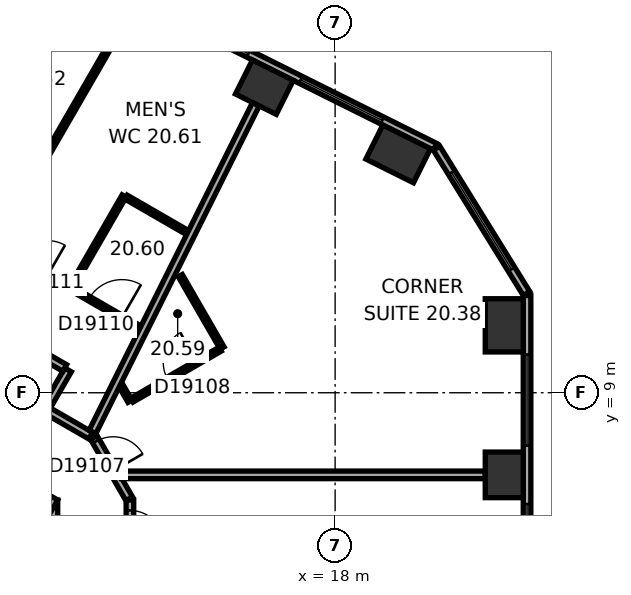
"""IFC4 building model, lengths in metres.
Left out: names, types, materials, properties, quantities, classifications, styles, units other than length and angle.
Written with IfcOpenShell. Run it as: python <this file> out.ifc"""

import sys

from ifc_helpers import new_model, si_unit, direction, frame, frame_2d, origin, origin_2d, place, context, subcontext, project, spatial, rectangle, extrude, element, fill, save


model = new_model("IFC4")
c1 = context("Model", 3, precision=1e-05, world=origin(), true_north=direction((0.0, 1.0)))
c2 = subcontext(c1, "Body", "Model", "MODEL_VIEW")
j1 = project(units=[si_unit("LENGTHUNIT", "METRE"), si_unit("PLANEANGLEUNIT", "RADIAN")], contexts=[c1])
p1 = place(None, origin())
s1 = spatial("IfcSite", under=j1, at=p1, CompositionType="ELEMENT")
p2 = place(p1, origin())
s2 = spatial("IfcBuilding", under=s1, at=p2, CompositionType="ELEMENT")
p3 = place(p2, frame((0.0, 0.0, 90.2)))
s3 = spatial("IfcBuildingStorey", under=s2, at=p3, CompositionType="ELEMENT", Elevation=90.2)
p4 = place(p3, frame((22.45, 6.839, 0.0), z_axis=(0.0, 0.0, 1.0), x_axis=(0.0, 1.0, 0.0)))
e1 = element("IfcColumn", 1, at=p4, inside=s3, PredefinedType="COLUMN", context=c2, shape_type="SweptSolid", body=[
    extrude(rectangle(XDim=1.2, YDim=1.0, at=origin_2d()), origin(), (0.0, 0.0, 1.0), 3.3),
])
for number, where, z_axis, x_axis in (
    (2, (22.45, 10.774, 0.0), (0.0, 0.0, 1.0), (0.0, 1.0, 0.0)),
    (3, (19.659, 15.284, 0.0), (0.0, 0.0, 1.0), (-0.895, 0.446, 0.0)),
):
    element("IfcColumn", number, at=place(p3, frame(where, z_axis=z_axis, x_axis=x_axis)), inside=s3, PredefinedType="COLUMN", context=c2, shape_type="SweptSolid", body=[
        extrude(rectangle(XDim=1.4, YDim=1.0, at=origin_2d()), origin(), (0.0, 0.0, 1.0), 3.3),
    ])
p5 = place(p3, frame((16.138, 17.04, 0.0), z_axis=(0.0, 0.0, 1.0), x_axis=(-0.894934361602, 0.44619781311, 0.0)))
e4 = element("IfcColumn", 4, at=p5, inside=s3, PredefinedType="COLUMN", context=c2, shape_type="SweptSolid", body=[
    extrude(rectangle(XDim=1.2, YDim=1.0, at=origin_2d()), origin(), (0.0, 0.0, 1.0), 3.3),
])
p6 = place(p3, frame((10.1, -6.177, 0.0), z_axis=(0.0, 0.0, 1.0), x_axis=(0.0, 1.0, 0.0)))
e5 = element("IfcWall", 5, at=p6, inside=s3, PredefinedType="SHEAR", context=c2, shape_type="SweptSolid", body=[
    extrude(rectangle(XDim=12.355, YDim=1.2, at=frame_2d((6.177, 0.0))), origin(), (0.0, 0.0, 1.0), 3.3),
])
p7 = place(p6, frame((6.378, 0.0, 0.0)))
e6 = element("IfcOpeningElement", 6, at=p7, cuts=e5, PredefinedType="OPENING", context=c2, shape_type="SweptSolid", body=[
    extrude(rectangle(XDim=1.5, YDim=2.1, at=frame_2d((0.75, 1.05))), frame((0.0, 0.61, 0.0), z_axis=(0.0, -1.0, 0.0), x_axis=(1.0, 0.0, 0.0)), (0.0, 0.0, 1.0), 1.22),
])
p8 = place(p6, frame((1.828, 0.0, 0.0)))
e7 = element("IfcOpeningElement", 7, at=p8, cuts=e5, PredefinedType="OPENING", context=c2, shape_type="SweptSolid", body=[
    extrude(rectangle(XDim=1.1, YDim=2.1, at=frame_2d((0.55, 1.05))), frame((0.0, 0.61, 0.0), z_axis=(0.0, -1.0, 0.0), x_axis=(1.0, 0.0, 0.0)), (0.0, 0.0, 1.0), 1.22),
])
p9 = place(p6, frame((4.427, 0.0, 0.0)))
e8 = element("IfcOpeningElement", 8, at=p9, cuts=e5, PredefinedType="OPENING", context=c2, shape_type="SweptSolid", body=[
    extrude(rectangle(XDim=1.1, YDim=2.1, at=frame_2d((0.55, 1.05))), frame((0.0, 0.61, 0.0), z_axis=(0.0, -1.0, 0.0), x_axis=(1.0, 0.0, 0.0)), (0.0, 0.0, 1.0), 1.22),
])
p10 = place(p3, frame((10.4, 5.658, 0.0), z_axis=(0.0, 0.0, 1.0), x_axis=(-0.866021384402, 0.500006961711, 0.0)))
e9 = element("IfcWall", 9, at=p10, inside=s3, PredefinedType="SHEAR", context=c2, shape_type="SweptSolid", body=[
    extrude(rectangle(XDim=12.355, YDim=1.2, at=frame_2d((6.178, 0.0))), origin(), (0.0, 0.0, 1.0), 3.3),
])
p11 = place(p10, frame((2.728, 0.0, 0.0)))
e10 = element("IfcOpeningElement", 10, at=p11, cuts=e9, PredefinedType="OPENING", context=c2, shape_type="SweptSolid", body=[
    extrude(rectangle(XDim=1.1, YDim=2.1, at=frame_2d((0.55, 1.05))), frame((0.0, 0.61, 0.0), z_axis=(0.0, -1.0, 0.0), x_axis=(1.0, 0.0, 0.0)), (0.0, 0.0, 1.0), 1.22),
])
p12 = place(p10, frame((5.328, 0.0, 0.0)))
e11 = element("IfcOpeningElement", 11, at=p12, cuts=e9, PredefinedType="OPENING", context=c2, shape_type="SweptSolid", body=[
    extrude(rectangle(XDim=1.1, YDim=2.1, at=frame_2d((0.55, 1.05))), frame((0.0, 0.61, 0.0), z_axis=(0.0, -1.0, 0.0), x_axis=(1.0, 0.0, 0.0)), (0.0, 0.0, 1.0), 1.22),
])
p13 = place(p10, frame((7.928, 0.0, 0.0)))
e12 = element("IfcOpeningElement", 12, at=p13, cuts=e9, PredefinedType="OPENING", context=c2, shape_type="SweptSolid", body=[
    extrude(rectangle(XDim=1.1, YDim=2.1, at=frame_2d((0.55, 1.05))), frame((0.0, 0.61, 0.0), z_axis=(0.0, -1.0, 0.0), x_axis=(1.0, 0.0, 0.0)), (0.0, 0.0, 1.0), 1.22),
])
p14 = place(p3, frame((23.05, -9.687, 0.0), z_axis=(0.0, 0.0, 1.0), x_axis=(0.0, 1.0, 0.0)))
e13 = element("IfcWall", 13, at=p14, inside=s3, PredefinedType="STANDARD", context=c2, shape_type="SweptSolid", body=[
    extrude(rectangle(XDim=21.246, YDim=0.2, at=frame_2d((10.623, 0.0))), origin(), (0.0, 0.0, 1.0), 3.3),
])
p15 = place(p14, frame((1.555, 0.0, 0.8)))
e14 = element("IfcOpeningElement", 14, at=p15, cuts=e13, PredefinedType="OPENING", context=c2, shape_type="SweptSolid", body=[
    extrude(rectangle(XDim=2.4, YDim=1.7, at=frame_2d((1.2, 0.85))), frame((0.0, 0.11, 0.0), z_axis=(0.0, -1.0, 0.0), x_axis=(1.0, 0.0, 0.0)), (0.0, 0.0, 1.0), 0.22),
])
p16 = place(p14, frame((5.489, 0.0, 0.8)))
e15 = element("IfcOpeningElement", 15, at=p16, cuts=e13, PredefinedType="OPENING", context=c2, shape_type="SweptSolid", body=[
    extrude(rectangle(XDim=2.4, YDim=1.7, at=frame_2d((1.2, 0.85))), frame((0.0, 0.11, 0.0), z_axis=(0.0, -1.0, 0.0), x_axis=(1.0, 0.0, 0.0)), (0.0, 0.0, 1.0), 0.22),
])
p17 = place(p14, frame((9.424, 0.0, 0.8)))
e16 = element("IfcOpeningElement", 16, at=p17, cuts=e13, PredefinedType="OPENING", context=c2, shape_type="SweptSolid", body=[
    extrude(rectangle(XDim=2.4, YDim=1.7, at=frame_2d((1.2, 0.85))), frame((0.0, 0.11, 0.0), z_axis=(0.0, -1.0, 0.0), x_axis=(1.0, 0.0, 0.0)), (0.0, 0.0, 1.0), 0.22),
])
p18 = place(p14, frame((13.358, 0.0, 0.8)))
e17 = element("IfcOpeningElement", 17, at=p18, cuts=e13, PredefinedType="OPENING", context=c2, shape_type="SweptSolid", body=[
    extrude(rectangle(XDim=2.4, YDim=1.7, at=frame_2d((1.2, 0.85))), frame((0.0, 0.11, 0.0), z_axis=(0.0, -1.0, 0.0), x_axis=(1.0, 0.0, 0.0)), (0.0, 0.0, 1.0), 0.22),
])
p19 = place(p14, frame((17.293, 0.0, 0.8)))
e18 = element("IfcOpeningElement", 18, at=p19, cuts=e13, PredefinedType="OPENING", context=c2, shape_type="SweptSolid", body=[
    extrude(rectangle(XDim=2.4, YDim=1.7, at=frame_2d((1.2, 0.85))), frame((0.0, 0.11, 0.0), z_axis=(0.0, -1.0, 0.0), x_axis=(1.0, 0.0, 0.0)), (0.0, 0.0, 1.0), 0.22),
])
p20 = place(p3, frame((23.035, 11.612, 0.0), z_axis=(0.0, 0.0, 1.0), x_axis=(-0.526160091227, 0.850385535155, 0.0)))
e19 = element("IfcWall", 19, at=p20, inside=s3, PredefinedType="STANDARD", context=c2, shape_type="SweptSolid", body=[
    extrude(rectangle(XDim=4.494, YDim=0.2, at=frame_2d((2.247, 0.0))), origin(), (0.0, 0.0, 1.0), 3.3),
])
p21 = place(p20, frame((0.747, 0.0, 0.8)))
e20 = element("IfcOpeningElement", 20, at=p21, cuts=e19, PredefinedType="OPENING", context=c2, shape_type="SweptSolid", body=[
    extrude(rectangle(XDim=3.0, YDim=1.7, at=frame_2d((1.5, 0.85))), frame((0.0, 0.11, 0.0), z_axis=(0.0, -1.0, 0.0), x_axis=(1.0, 0.0, 0.0)), (0.0, 0.0, 1.0), 0.22),
])
p22 = place(p3, frame((20.63, 15.47, 0.0), z_axis=(0.0, 0.0, 1.0), x_axis=(-0.894934518609, 0.446197498203, 0.0)))
e21 = element("IfcWall", 21, at=p22, inside=s3, PredefinedType="STANDARD", context=c2, shape_type="SweptSolid", body=[
    extrude(rectangle(XDim=21.246, YDim=0.2, at=frame_2d((10.623, 0.0))), origin(), (0.0, 0.0, 1.0), 3.3),
])
p23 = place(p22, frame((1.553, 0.0, 0.8)))
e22 = element("IfcOpeningElement", 22, at=p23, cuts=e21, PredefinedType="OPENING", context=c2, shape_type="SweptSolid", body=[
    extrude(rectangle(XDim=2.4, YDim=1.7, at=frame_2d((1.2, 0.85))), frame((0.0, 0.11, 0.0), z_axis=(0.0, -1.0, 0.0), x_axis=(1.0, 0.0, 0.0)), (0.0, 0.0, 1.0), 0.22),
])
p24 = place(p22, frame((5.488, 0.0, 0.8)))
e23 = element("IfcOpeningElement", 23, at=p24, cuts=e21, PredefinedType="OPENING", context=c2, shape_type="SweptSolid", body=[
    extrude(rectangle(XDim=2.4, YDim=1.7, at=frame_2d((1.2, 0.85))), frame((0.0, 0.11, 0.0), z_axis=(0.0, -1.0, 0.0), x_axis=(1.0, 0.0, 0.0)), (0.0, 0.0, 1.0), 0.22),
])
p25 = place(p22, frame((9.422, 0.0, 0.8)))
e24 = element("IfcOpeningElement", 24, at=p25, cuts=e21, PredefinedType="OPENING", context=c2, shape_type="SweptSolid", body=[
    extrude(rectangle(XDim=2.4, YDim=1.7, at=frame_2d((1.2, 0.85))), frame((0.0, 0.11, 0.0), z_axis=(0.0, -1.0, 0.0), x_axis=(1.0, 0.0, 0.0)), (0.0, 0.0, 1.0), 0.22),
])
p26 = place(p22, frame((13.357, 0.0, 0.8)))
e25 = element("IfcOpeningElement", 25, at=p26, cuts=e21, PredefinedType="OPENING", context=c2, shape_type="SweptSolid", body=[
    extrude(rectangle(XDim=2.4, YDim=1.7, at=frame_2d((1.2, 0.85))), frame((0.0, 0.11, 0.0), z_axis=(0.0, -1.0, 0.0), x_axis=(1.0, 0.0, 0.0)), (0.0, 0.0, 1.0), 0.22),
])
p27 = place(p22, frame((17.292, 0.0, 0.8)))
e26 = element("IfcOpeningElement", 26, at=p27, cuts=e21, PredefinedType="OPENING", context=c2, shape_type="SweptSolid", body=[
    extrude(rectangle(XDim=2.4, YDim=1.7, at=frame_2d((1.2, 0.85))), frame((0.0, 0.11, 0.0), z_axis=(0.0, -1.0, 0.0), x_axis=(1.0, 0.0, 0.0)), (0.0, 0.0, 1.0), 0.22),
])
p28 = place(p3, frame((10.371, 8.561, 0.0), z_axis=(0.0, 0.0, 1.0), x_axis=(0.499986357472, 0.866033280158, 0.0)))
e27 = element("IfcWall", 27, at=p28, inside=s3, PredefinedType="PARTITIONING", context=c2, shape_type="SweptSolid", body=[
    extrude(rectangle(XDim=1.201, YDim=0.2, at=frame_2d((0.601, 0.0))), origin(), (0.0, 0.0, 1.0), 3.05),
])
p29 = place(p3, frame((10.885, 9.652, 0.0), z_axis=(0.0, 0.0, 1.0), x_axis=(-0.866033868542, 0.499985338323, 0.0)))
e28 = element("IfcWall", 28, at=p29, inside=s3, PredefinedType="PARTITIONING", context=c2, shape_type="SweptSolid", body=[
    extrude(rectangle(XDim=8.602, YDim=0.2, at=frame_2d((4.301, 0.0))), origin(), (0.0, 0.0, 1.0), 3.05),
])
p30 = place(p29, frame((2.739, 0.0, 0.0)))
e29 = element("IfcOpeningElement", 29, at=p30, cuts=e28, PredefinedType="OPENING", context=c2, shape_type="SweptSolid", body=[
    extrude(rectangle(XDim=1.0, YDim=2.1, at=frame_2d((0.5, 1.05))), frame((0.0, 0.11, 0.0), z_axis=(0.0, -1.0, 0.0), x_axis=(1.0, 0.0, 0.0)), (0.0, 0.0, 1.0), 0.22),
])
p31 = place(p3, frame((11.566, 7.871, 0.0), z_axis=(0.0, 0.0, 1.0), x_axis=(-0.866004557827, 0.500036104519, 0.0)))
e30 = element("IfcWall", 30, at=p31, inside=s3, PredefinedType="PARTITIONING", context=c2, shape_type="SweptSolid", body=[
    extrude(rectangle(XDim=1.28, YDim=0.2, at=frame_2d((0.64, 0.0))), origin(), (0.0, 0.0, 1.0), 3.05),
])
p32 = place(p3, frame((12.243, 18.423, 0.0), z_axis=(0.0, 0.0, 1.0), x_axis=(-0.499993523031, -0.866029143232, 0.0)))
e31 = element("IfcWall", 31, at=p32, inside=s3, PredefinedType="PARTITIONING", context=c2, shape_type="SweptSolid", body=[
    extrude(rectangle(XDim=6.315, YDim=0.12, at=frame_2d((3.157, 0.0))), origin(), (0.0, 0.0, 1.0), 2.6),
])
p33 = place(p3, frame((12.448, 14.177, 0.0), z_axis=(0.0, 0.0, 1.0), x_axis=(-0.500048966069, -0.865997131366, 0.0)))
e32 = element("IfcWall", 32, at=p33, inside=s3, PredefinedType="PARTITIONING", context=c2, shape_type="SweptSolid", body=[
    extrude(rectangle(XDim=2.74, YDim=0.12, at=frame_2d((1.37, 0.0))), origin(), (0.0, 0.0, 1.0), 3.05),
])
p34 = place(p3, frame((12.58, 6.212, 0.0), z_axis=(0.0, 0.0, 1.0), x_axis=(-0.500063286585, 0.865988862174, 0.0)))
e33 = element("IfcWall", 33, at=p34, inside=s3, PredefinedType="PARTITIONING", context=c2, shape_type="SweptSolid", body=[
    extrude(rectangle(XDim=1.86, YDim=0.2, at=frame_2d((0.93, 0.0))), origin(), (0.0, 0.0, 1.0), 3.05),
])
p35 = place(p34, frame((0.842, 0.0, 0.0)))
e34 = element("IfcOpeningElement", 34, at=p35, cuts=e33, PredefinedType="OPENING", context=c2, shape_type="SweptSolid", body=[
    extrude(rectangle(XDim=0.9, YDim=2.1, at=frame_2d((0.45, 1.05))), frame((0.0, 0.11, 0.0), z_axis=(0.0, -1.0, 0.0), x_axis=(1.0, 0.0, 0.0)), (0.0, 0.0, 1.0), 0.22),
])
p36 = place(p3, frame((12.6, 3.004, 0.0), z_axis=(0.0, 0.0, 1.0), x_axis=(0.0, 1.0, 0.0)))
e35 = element("IfcWall", 35, at=p36, inside=s3, PredefinedType="PARTITIONING", context=c2, shape_type="SweptSolid", body=[
    extrude(rectangle(XDim=3.173, YDim=0.2, at=frame_2d((1.586, 0.0))), origin(), (0.0, 0.0, 1.0), 3.05),
])
p37 = place(p36, frame((1.998, 0.0, 0.0)))
e36 = element("IfcOpeningElement", 36, at=p37, cuts=e35, PredefinedType="OPENING", context=c2, shape_type="SweptSolid", body=[
    extrude(rectangle(XDim=0.9, YDim=2.1, at=frame_2d((0.45, 1.05))), frame((0.0, 0.11, 0.0), z_axis=(0.0, -1.0, 0.0), x_axis=(1.0, 0.0, 0.0)), (0.0, 0.0, 1.0), 0.22),
])
p38 = place(p3, frame((12.601, 8.776, 0.0), z_axis=(0.0, 0.0, 1.0), x_axis=(-0.500166486798, 0.865929261247, 0.0)))
e37 = element("IfcWall", 37, at=p38, inside=s3, PredefinedType="PARTITIONING", context=c2, shape_type="SweptSolid", body=[
    extrude(rectangle(XDim=0.476, YDim=0.12, at=frame_2d((0.238, 0.0))), origin(), (0.0, 0.0, 1.0), 3.05),
])
p39 = place(p3, frame((12.866, 10.702, 0.0), z_axis=(0.0, 0.0, 1.0), x_axis=(-0.866023151433, 0.500003901167, 0.0)))
e38 = element("IfcWall", 38, at=p39, inside=s3, PredefinedType="PARTITIONING", context=c2, shape_type="SweptSolid", body=[
    extrude(rectangle(XDim=7.684, YDim=0.12, at=frame_2d((3.842, 0.0))), origin(), (0.0, 0.0, 1.0), 3.05),
])
p40 = place(p39, frame((0.55, 0.0, 0.0)))
e39 = element("IfcOpeningElement", 39, at=p40, cuts=e38, PredefinedType="OPENING", context=c2, shape_type="SweptSolid", body=[
    extrude(rectangle(XDim=1.0, YDim=2.1, at=frame_2d((0.5, 1.05))), frame((0.0, 0.07, 0.0), z_axis=(0.0, -1.0, 0.0), x_axis=(1.0, 0.0, 0.0)), (0.0, 0.0, 1.0), 0.14),
])
p41 = place(p39, frame((2.8, 0.0, 0.0)))
e40 = element("IfcOpeningElement", 40, at=p41, cuts=e38, PredefinedType="OPENING", context=c2, shape_type="SweptSolid", body=[
    extrude(rectangle(XDim=0.9, YDim=2.1, at=frame_2d((0.45, 1.05))), frame((0.0, 0.07, 0.0), z_axis=(0.0, -1.0, 0.0), x_axis=(1.0, 0.0, 0.0)), (0.0, 0.0, 1.0), 0.14),
])
p42 = place(p39, frame((5.592, 0.0, 0.0)))
e41 = element("IfcOpeningElement", 41, at=p42, cuts=e38, PredefinedType="OPENING", context=c2, shape_type="SweptSolid", body=[
    extrude(rectangle(XDim=0.9, YDim=2.1, at=frame_2d((0.45, 1.05))), frame((0.0, 0.07, 0.0), z_axis=(0.0, -1.0, 0.0), x_axis=(1.0, 0.0, 0.0)), (0.0, 0.0, 1.0), 0.14),
])
p43 = place(p3, frame((13.926, 12.081, 0.0), z_axis=(0.0, 0.0, 1.0), x_axis=(0.499994660107, -0.866028486751, 0.0)))
e42 = element("IfcWall", 42, at=p43, inside=s3, PredefinedType="PARTITIONING", context=c2, shape_type="SweptSolid", body=[
    extrude(rectangle(XDim=2.2, YDim=0.12, at=frame_2d((1.1, 0.0))), origin(), (0.0, 0.0, 1.0), 3.05),
])
p44 = place(p3, frame((14.118, 13.212, 0.0), z_axis=(0.0, 0.0, 1.0), x_axis=(-0.866039825209, 0.499975020527, 0.0)))
e43 = element("IfcWall", 43, at=p44, inside=s3, PredefinedType="PARTITIONING", context=c2, shape_type="SweptSolid", body=[
    extrude(rectangle(XDim=1.869, YDim=0.12, at=frame_2d((0.934, 0.0))), origin(), (0.0, 0.0, 1.0), 3.05),
])
p45 = place(p3, frame((14.974, 10.146, 0.0), z_axis=(0.0, 0.0, 1.0), x_axis=(-0.86599746015, -0.500048396672, 0.0)))
e44 = element("IfcWall", 44, at=p45, inside=s3, PredefinedType="PARTITIONING", context=c2, shape_type="SweptSolid", body=[
    extrude(rectangle(XDim=2.68, YDim=0.12, at=frame_2d((1.34, 0.0))), origin(), (0.0, 0.0, 1.0), 3.05),
])
p46 = place(p45, frame((0.69, 0.0, 0.0)))
e45 = element("IfcOpeningElement", 45, at=p46, cuts=e44, PredefinedType="OPENING", context=c2, shape_type="SweptSolid", body=[
    extrude(rectangle(XDim=0.9, YDim=2.1, at=frame_2d((0.45, 1.05))), frame((0.0, 0.07, 0.0), z_axis=(0.0, -1.0, 0.0), x_axis=(1.0, 0.0, 0.0)), (0.0, 0.0, 1.0), 0.14),
])
p47 = place(p3, frame((15.915, 16.592, 0.0), z_axis=(0.0, 0.0, 1.0), x_axis=(-0.446199736347, -0.894933402709, 0.0)))
e46 = element("IfcWall", 46, at=p47, inside=s3, PredefinedType="PARTITIONING", context=c2, shape_type="SweptSolid", body=[
    extrude(rectangle(XDim=9.635, YDim=0.2, at=frame_2d((4.817, 0.0))), origin(), (0.0, 0.0, 1.0), 3.05),
])
p48 = place(p3, frame((21.95, 6.839, 0.0), z_axis=(0.0, 0.0, 1.0), x_axis=(-1.0, 0.0, 0.0)))
e47 = element("IfcWall", 47, at=p48, inside=s3, PredefinedType="PARTITIONING", context=c2, shape_type="SweptSolid", body=[
    extrude(rectangle(XDim=9.572, YDim=0.2, at=frame_2d((4.786, 0.0))), origin(), (0.0, 0.0, 1.0), 3.05),
])
p49 = place(p18, origin())
e48 = element("IfcWindow", 48, at=p49, inside=s3, PartitioningType="SINGLE_PANEL", PredefinedType="WINDOW", context=c2, shape_type="SweptSolid", body=[
    extrude(rectangle(XDim=2.4, YDim=1.7, at=frame_2d((1.2, 0.85))), frame((0.0, 0.03, 0.0), z_axis=(0.0, -1.0, 0.0), x_axis=(1.0, 0.0, 0.0)), (0.0, 0.0, 1.0), 0.06),
])
fill(e17, e48)
p50 = place(p19, origin())
e49 = element("IfcWindow", 49, at=p50, inside=s3, PartitioningType="SINGLE_PANEL", PredefinedType="WINDOW", context=c2, shape_type="SweptSolid", body=[
    extrude(rectangle(XDim=2.4, YDim=1.7, at=frame_2d((1.2, 0.85))), frame((0.0, 0.03, 0.0), z_axis=(0.0, -1.0, 0.0), x_axis=(1.0, 0.0, 0.0)), (0.0, 0.0, 1.0), 0.06),
])
fill(e18, e49)
p51 = place(p21, origin())
e50 = element("IfcWindow", 50, at=p51, inside=s3, PartitioningType="SINGLE_PANEL", PredefinedType="WINDOW", context=c2, shape_type="SweptSolid", body=[
    extrude(rectangle(XDim=3.0, YDim=1.7, at=frame_2d((1.5, 0.85))), frame((0.0, 0.03, 0.0), z_axis=(0.0, -1.0, 0.0), x_axis=(1.0, 0.0, 0.0)), (0.0, 0.0, 1.0), 0.06),
])
fill(e20, e50)
p52 = place(p23, origin())
e51 = element("IfcWindow", 51, at=p52, inside=s3, PartitioningType="SINGLE_PANEL", PredefinedType="WINDOW", context=c2, shape_type="SweptSolid", body=[
    extrude(rectangle(XDim=2.4, YDim=1.7, at=frame_2d((1.2, 0.85))), frame((0.0, 0.03, 0.0), z_axis=(0.0, -1.0, 0.0), x_axis=(1.0, 0.0, 0.0)), (0.0, 0.0, 1.0), 0.06),
])
fill(e22, e51)
p53 = place(p24, origin())
e52 = element("IfcWindow", 52, at=p53, inside=s3, PartitioningType="SINGLE_PANEL", PredefinedType="WINDOW", context=c2, shape_type="SweptSolid", body=[
    extrude(rectangle(XDim=2.4, YDim=1.7, at=frame_2d((1.2, 0.85))), frame((0.0, 0.03, 0.0), z_axis=(0.0, -1.0, 0.0), x_axis=(1.0, 0.0, 0.0)), (0.0, 0.0, 1.0), 0.06),
])
fill(e23, e52)
p54 = place(p37, origin())
e53 = element("IfcDoor", 53, at=p54, inside=s3, OperationType="SINGLE_SWING_LEFT", PredefinedType="DOOR", context=c2, shape_type="SweptSolid", body=[
    extrude(rectangle(XDim=0.9, YDim=2.1, at=frame_2d((0.45, 1.05))), frame((0.0, 0.025, 0.0), z_axis=(0.0, -1.0, 0.0), x_axis=(1.0, 0.0, 0.0)), (0.0, 0.0, 1.0), 0.05),
])
fill(e36, e53)
p55 = place(p35, origin())
e54 = element("IfcDoor", 54, at=p55, inside=s3, OperationType="SINGLE_SWING_LEFT", PredefinedType="DOOR", context=c2, shape_type="SweptSolid", body=[
    extrude(rectangle(XDim=0.9, YDim=2.1, at=frame_2d((0.45, 1.05))), frame((0.0, 0.025, 0.0), z_axis=(0.0, -1.0, 0.0), x_axis=(1.0, 0.0, 0.0)), (0.0, 0.0, 1.0), 0.05),
])
fill(e34, e54)
p56 = place(p46, origin())
e55 = element("IfcDoor", 55, at=p56, inside=s3, OperationType="SINGLE_SWING_LEFT", PredefinedType="DOOR", context=c2, shape_type="SweptSolid", body=[
    extrude(rectangle(XDim=0.9, YDim=2.1, at=frame_2d((0.45, 1.05))), frame((0.0, 0.025, 0.0), z_axis=(0.0, -1.0, 0.0), x_axis=(1.0, 0.0, 0.0)), (0.0, 0.0, 1.0), 0.05),
])
fill(e45, e55)
p57 = place(p40, origin())
e56 = element("IfcDoor", 56, at=p57, inside=s3, OperationType="SINGLE_SWING_LEFT", PredefinedType="DOOR", context=c2, shape_type="SweptSolid", body=[
    extrude(rectangle(XDim=1.0, YDim=2.1, at=frame_2d((0.5, 1.05))), frame((0.0, 0.025, 0.0), z_axis=(0.0, -1.0, 0.0), x_axis=(1.0, 0.0, 0.0)), (0.0, 0.0, 1.0), 0.05),
])
fill(e39, e56)
save(model, sys.argv[1])
